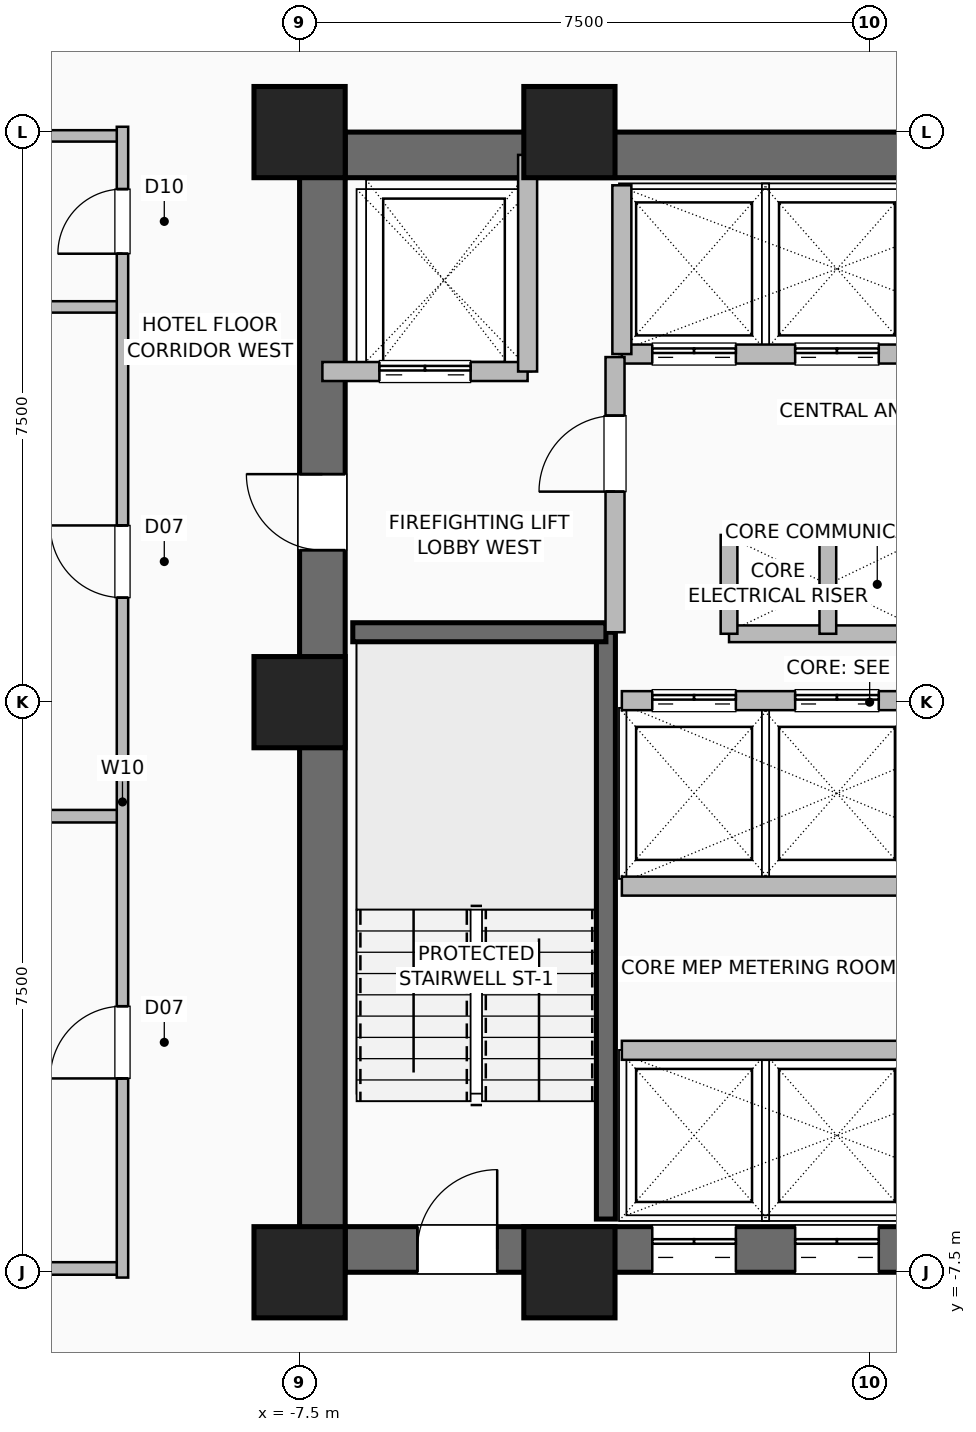
"""IFC4 building model, lengths in metres.
Left out: names, types, materials, properties, quantities, classifications, styles, units other than length and angle.
Written with IfcOpenShell. Run it as: python <this file> out.ifc"""

import sys

from ifc_helpers import new_model, si_unit, direction, frame, frame_2d, origin, origin_2d, place, context, subcontext, project, spatial, rectangle, hollow_rectangle, extrude, element, fill, save


model = new_model("IFC4")
c1 = context("Model", 3, precision=1e-05, world=origin(), true_north=direction((0.0, 1.0)))
c2 = subcontext(c1, "Body", "Model", "MODEL_VIEW")
j1 = project(units=[si_unit("LENGTHUNIT", "METRE"), si_unit("PLANEANGLEUNIT", "RADIAN")], contexts=[c1])
p1 = place(None, origin())
s1 = spatial("IfcSite", under=j1, at=p1, CompositionType="ELEMENT")
p2 = place(p1, origin())
s2 = spatial("IfcBuilding", under=s1, at=p2, CompositionType="ELEMENT")
p3 = place(p2, frame((0.0, 0.0, 58.5)))
s3 = spatial("IfcBuildingStorey", under=s2, at=p3, CompositionType="ELEMENT", Elevation=58.5)
for number, where, z_axis, x_axis in (
    (1, (-7.5, -7.5, 0.0), (0.0, 0.0, 1.0), (1.0, 0.0, 0.0)),
    (2, (-3.95, -7.5, 0.0), (0.0, 0.0, 1.0), (1.0, 0.0, 0.0)),
    (3, (-3.95, 7.5, 0.0), (0.0, 0.0, 1.0), (1.0, 0.0, 0.0)),
    (4, (-7.5, 7.5, 0.0), (0.0, 0.0, 1.0), (1.0, 0.0, 0.0)),
    (5, (-7.5, 0.0, 0.0), (0.0, 0.0, 1.0), (1.0, 0.0, 0.0)),
):
    element("IfcColumn", number, at=place(p3, frame(where, z_axis=z_axis, x_axis=x_axis)), inside=s3, PredefinedType="COLUMN", context=c2, shape_type="SweptSolid", body=[
        extrude(hollow_rectangle(XDim=1.2, YDim=1.2, WallThickness=0.055, at=origin_2d()), origin(), (0.0, 0.0, 1.0), 3.5),
    ])
p4 = place(p3, frame((-7.5, -7.2, 0.0), z_axis=(0.0, 0.0, 1.0), x_axis=(1.0, 0.0, 0.0)))
e6 = element("IfcWall", 6, at=p4, inside=s3, PredefinedType="SHEAR", context=c2, shape_type="SweptSolid", body=[
    extrude(rectangle(XDim=15.0, YDim=0.6, at=frame_2d((7.5, 0.0))), origin(), (0.0, 0.0, 1.0), 3.25),
])
p5 = place(p4, frame((1.55, 0.0, 0.0)))
e7 = element("IfcOpeningElement", 7, at=p5, cuts=e6, PredefinedType="OPENING", context=c2, shape_type="SweptSolid", body=[
    extrude(rectangle(XDim=1.05, YDim=2.08, at=frame_2d((0.525, 1.04))), frame((0.0, 0.31, 0.0), z_axis=(0.0, -1.0, 0.0), x_axis=(1.0, 0.0, 0.0)), (0.0, 0.0, 1.0), 0.62),
])
p6 = place(p4, frame((12.4, 0.0, 0.0)))
e8 = element("IfcOpeningElement", 8, at=p6, cuts=e6, PredefinedType="OPENING", context=c2, shape_type="SweptSolid", body=[
    extrude(rectangle(XDim=1.05, YDim=2.08, at=frame_2d((0.525, 1.04))), frame((0.0, 0.31, 0.0), z_axis=(0.0, -1.0, 0.0), x_axis=(1.0, 0.0, 0.0)), (0.0, 0.0, 1.0), 0.62),
])
p7 = place(p4, frame((4.64, 0.0, 0.0)))
e9 = element("IfcOpeningElement", 9, at=p7, cuts=e6, PredefinedType="OPENING", context=c2, shape_type="SweptSolid", body=[
    extrude(rectangle(XDim=1.1, YDim=2.2, at=frame_2d((0.55, 1.1))), frame((0.0, 0.31, 0.0), z_axis=(0.0, -1.0, 0.0), x_axis=(1.0, 0.0, 0.0)), (0.0, 0.0, 1.0), 0.62),
])
p8 = place(p4, frame((6.52, 0.0, 0.0)))
e10 = element("IfcOpeningElement", 10, at=p8, cuts=e6, PredefinedType="OPENING", context=c2, shape_type="SweptSolid", body=[
    extrude(rectangle(XDim=1.1, YDim=2.2, at=frame_2d((0.55, 1.1))), frame((0.0, 0.31, 0.0), z_axis=(0.0, -1.0, 0.0), x_axis=(1.0, 0.0, 0.0)), (0.0, 0.0, 1.0), 0.62),
])
p9 = place(p4, frame((8.4, 0.0, 0.0)))
e11 = element("IfcOpeningElement", 11, at=p9, cuts=e6, PredefinedType="OPENING", context=c2, shape_type="SweptSolid", body=[
    extrude(rectangle(XDim=1.1, YDim=2.2, at=frame_2d((0.55, 1.1))), frame((0.0, 0.31, 0.0), z_axis=(0.0, -1.0, 0.0), x_axis=(1.0, 0.0, 0.0)), (0.0, 0.0, 1.0), 0.62),
])
p10 = place(p3, frame((-7.5, 7.2, 0.0), z_axis=(0.0, 0.0, 1.0), x_axis=(1.0, 0.0, 0.0)))
e12 = element("IfcWall", 12, at=p10, inside=s3, PredefinedType="SHEAR", context=c2, shape_type="SweptSolid", body=[
    extrude(rectangle(XDim=15.0, YDim=0.6, at=frame_2d((7.5, 0.0))), origin(), (0.0, 0.0, 1.0), 3.25),
])
p11 = place(p3, frame((-7.2, -7.5, 0.0), z_axis=(0.0, 0.0, 1.0), x_axis=(0.0, 1.0, 0.0)))
e13 = element("IfcWall", 13, at=p11, inside=s3, PredefinedType="SHEAR", context=c2, shape_type="SweptSolid", body=[
    extrude(rectangle(XDim=15.0, YDim=0.6, at=frame_2d((7.5, 0.0))), origin(), (0.0, 0.0, 1.0), 3.25),
])
p12 = place(p11, frame((9.5, 0.0, 0.0)))
e14 = element("IfcOpeningElement", 14, at=p12, cuts=e13, PredefinedType="OPENING", context=c2, shape_type="SweptSolid", body=[
    extrude(rectangle(XDim=1.0, YDim=2.08, at=frame_2d((0.5, 1.04))), frame((0.0, 0.31, 0.0), z_axis=(0.0, -1.0, 0.0), x_axis=(1.0, 0.0, 0.0)), (0.0, 0.0, 1.0), 0.62),
])
p13 = place(p3, frame((-3.47, -6.8, 0.0), z_axis=(0.0, 0.0, 1.0), x_axis=(0.0, 1.0, 0.0)))
e15 = element("IfcWall", 15, at=p13, inside=s3, PredefinedType="SHEAR", context=c2, shape_type="SweptSolid", body=[
    extrude(rectangle(XDim=7.72, YDim=0.25, at=frame_2d((3.86, 0.0))), origin(), (0.0, 0.0, 1.0), 3.25),
])
p14 = place(p3, frame((-6.8, 0.92, 0.0), z_axis=(0.0, 0.0, 1.0), x_axis=(1.0, 0.0, 0.0)))
e16 = element("IfcWall", 16, at=p14, inside=s3, PredefinedType="SHEAR", context=c2, shape_type="SweptSolid", body=[
    extrude(rectangle(XDim=3.33, YDim=0.25, at=frame_2d((1.665, 0.0))), origin(), (0.0, 0.0, 1.0), 3.25),
])
for number, where, z_axis, x_axis in (
    (17, (-1.85, 2.2, 0.0), (0.0, 0.0, 1.0), (1.0, 0.0, 0.0)),
    (18, (-1.85, 0.9, 0.0), (0.0, 0.0, 1.0), (1.0, 0.0, 0.0)),
):
    element("IfcWall", number, at=place(p3, frame(where, z_axis=z_axis, x_axis=x_axis)), inside=s3, PredefinedType="PARTITIONING", context=c2, shape_type="SweptSolid", body=[
        extrude(rectangle(XDim=2.6, YDim=0.22, at=frame_2d((1.3, 0.0))), origin(), (0.0, 0.0, 1.0), 3.25),
    ])
for number, where, z_axis, x_axis in (
    (19, (-0.55, 0.9, 0.0), (0.0, 0.0, 1.0), (0.0, 1.0, 0.0)),
    (20, (-1.85, 0.9, 0.0), (0.0, 0.0, 1.0), (0.0, 1.0, 0.0)),
):
    element("IfcWall", number, at=place(p3, frame(where, z_axis=z_axis, x_axis=x_axis)), inside=s3, PredefinedType="PARTITIONING", context=c2, shape_type="SweptSolid", body=[
        extrude(rectangle(XDim=1.3, YDim=0.22, at=frame_2d((0.65, 0.0))), origin(), (0.0, 0.0, 1.0), 3.25),
    ])
p15 = place(p3, frame((-3.26, -4.58, 0.0), z_axis=(0.0, 0.0, 1.0), x_axis=(1.0, 0.0, 0.0)))
e21 = element("IfcWall", 21, at=p15, inside=s3, PredefinedType="SHEAR", context=c2, shape_type="SweptSolid", body=[
    extrude(rectangle(XDim=5.64, YDim=0.25, at=frame_2d((2.82, 0.0))), origin(), (0.0, 0.0, 1.0), 3.25),
])
p16 = place(p3, frame((-3.26, 0.02, 0.0), z_axis=(0.0, 0.0, 1.0), x_axis=(1.0, 0.0, 0.0)))
e22 = element("IfcWall", 22, at=p16, inside=s3, PredefinedType="SHEAR", context=c2, shape_type="SweptSolid", body=[
    extrude(rectangle(XDim=5.64, YDim=0.25, at=frame_2d((2.82, 0.0))), origin(), (0.0, 0.0, 1.0), 3.25),
])
p17 = place(p16, frame((0.4, 0.0, 0.0)))
e23 = element("IfcOpeningElement", 23, at=p17, cuts=e22, PredefinedType="OPENING", context=c2, shape_type="SweptSolid", body=[
    extrude(rectangle(XDim=1.1, YDim=2.2, at=frame_2d((0.55, 1.1))), frame((0.0, 0.135, 0.0), z_axis=(0.0, -1.0, 0.0), x_axis=(1.0, 0.0, 0.0)), (0.0, 0.0, 1.0), 0.27),
])
p18 = place(p16, frame((2.28, 0.0, 0.0)))
e24 = element("IfcOpeningElement", 24, at=p18, cuts=e22, PredefinedType="OPENING", context=c2, shape_type="SweptSolid", body=[
    extrude(rectangle(XDim=1.1, YDim=2.2, at=frame_2d((0.55, 1.1))), frame((0.0, 0.135, 0.0), z_axis=(0.0, -1.0, 0.0), x_axis=(1.0, 0.0, 0.0)), (0.0, 0.0, 1.0), 0.27),
])
p19 = place(p16, frame((4.16, 0.0, 0.0)))
e25 = element("IfcOpeningElement", 25, at=p19, cuts=e22, PredefinedType="OPENING", context=c2, shape_type="SweptSolid", body=[
    extrude(rectangle(XDim=1.1, YDim=2.2, at=frame_2d((0.55, 1.1))), frame((0.0, 0.135, 0.0), z_axis=(0.0, -1.0, 0.0), x_axis=(1.0, 0.0, 0.0)), (0.0, 0.0, 1.0), 0.27),
])
p20 = place(p3, frame((-3.26, -2.42, 0.0), z_axis=(0.0, 0.0, 1.0), x_axis=(1.0, 0.0, 0.0)))
e26 = element("IfcWall", 26, at=p20, inside=s3, PredefinedType="SHEAR", context=c2, shape_type="SweptSolid", body=[
    extrude(rectangle(XDim=5.64, YDim=0.25, at=frame_2d((2.82, 0.0))), origin(), (0.0, 0.0, 1.0), 3.25),
])
p21 = place(p3, frame((-3.26, 4.58, 0.0), z_axis=(0.0, 0.0, 1.0), x_axis=(1.0, 0.0, 0.0)))
e27 = element("IfcWall", 27, at=p21, inside=s3, PredefinedType="SHEAR", context=c2, shape_type="SweptSolid", body=[
    extrude(rectangle(XDim=5.64, YDim=0.25, at=frame_2d((2.82, 0.0))), origin(), (0.0, 0.0, 1.0), 3.25),
])
p22 = place(p21, frame((0.4, 0.0, 0.0)))
e28 = element("IfcOpeningElement", 28, at=p22, cuts=e27, PredefinedType="OPENING", context=c2, shape_type="SweptSolid", body=[
    extrude(rectangle(XDim=1.1, YDim=2.2, at=frame_2d((0.55, 1.1))), frame((0.0, 0.135, 0.0), z_axis=(0.0, -1.0, 0.0), x_axis=(1.0, 0.0, 0.0)), (0.0, 0.0, 1.0), 0.27),
])
p23 = place(p21, frame((2.28, 0.0, 0.0)))
e29 = element("IfcOpeningElement", 29, at=p23, cuts=e27, PredefinedType="OPENING", context=c2, shape_type="SweptSolid", body=[
    extrude(rectangle(XDim=1.1, YDim=2.2, at=frame_2d((0.55, 1.1))), frame((0.0, 0.135, 0.0), z_axis=(0.0, -1.0, 0.0), x_axis=(1.0, 0.0, 0.0)), (0.0, 0.0, 1.0), 0.27),
])
p24 = place(p21, frame((4.16, 0.0, 0.0)))
e30 = element("IfcOpeningElement", 30, at=p24, cuts=e27, PredefinedType="OPENING", context=c2, shape_type="SweptSolid", body=[
    extrude(rectangle(XDim=1.1, YDim=2.2, at=frame_2d((0.55, 1.1))), frame((0.0, 0.135, 0.0), z_axis=(0.0, -1.0, 0.0), x_axis=(1.0, 0.0, 0.0)), (0.0, 0.0, 1.0), 0.27),
])
p25 = place(p3, frame((-3.26, 4.58, 0.0), z_axis=(0.0, 0.0, 1.0), x_axis=(0.0, 1.0, 0.0)))
e31 = element("IfcWall", 31, at=p25, inside=s3, PredefinedType="SHEAR", context=c2, shape_type="SweptSolid", body=[
    extrude(rectangle(XDim=2.22, YDim=0.25, at=frame_2d((1.11, 0.0))), origin(), (0.0, 0.0, 1.0), 3.25),
])
p26 = place(p3, frame((-7.2, 4.35, 0.0), z_axis=(0.0, 0.0, 1.0), x_axis=(1.0, 0.0, 0.0)))
e32 = element("IfcWall", 32, at=p26, inside=s3, PredefinedType="SHEAR", context=c2, shape_type="SweptSolid", body=[
    extrude(rectangle(XDim=2.7, YDim=0.25, at=frame_2d((1.35, 0.0))), origin(), (0.0, 0.0, 1.0), 3.25),
])
p27 = place(p26, frame((0.75, 0.0, 0.0)))
e33 = element("IfcOpeningElement", 33, at=p27, cuts=e32, PredefinedType="OPENING", context=c2, shape_type="SweptSolid", body=[
    extrude(rectangle(XDim=1.2, YDim=2.2, at=frame_2d((0.6, 1.1))), frame((0.0, 0.135, 0.0), z_axis=(0.0, -1.0, 0.0), x_axis=(1.0, 0.0, 0.0)), (0.0, 0.0, 1.0), 0.27),
])
p28 = place(p3, frame((-4.5, 4.35, 0.0), z_axis=(0.0, 0.0, 1.0), x_axis=(0.0, 1.0, 0.0)))
e34 = element("IfcWall", 34, at=p28, inside=s3, PredefinedType="SHEAR", context=c2, shape_type="SweptSolid", body=[
    extrude(rectangle(XDim=2.85, YDim=0.25, at=frame_2d((1.425, 0.0))), origin(), (0.0, 0.0, 1.0), 3.25),
])
p29 = place(p3, frame((-3.35, 0.92, 0.0), z_axis=(0.0, 0.0, 1.0), x_axis=(0.0, 1.0, 0.0)))
e35 = element("IfcWall", 35, at=p29, inside=s3, PredefinedType="SHEAR", context=c2, shape_type="SweptSolid", body=[
    extrude(rectangle(XDim=3.62, YDim=0.25, at=frame_2d((1.81, 0.0))), origin(), (0.0, 0.0, 1.0), 3.25),
])
p30 = place(p29, frame((1.85, 0.0, 0.0)))
e36 = element("IfcOpeningElement", 36, at=p30, cuts=e35, PredefinedType="OPENING", context=c2, shape_type="SweptSolid", body=[
    extrude(rectangle(XDim=1.0, YDim=2.08, at=frame_2d((0.5, 1.04))), frame((0.0, 0.135, 0.0), z_axis=(0.0, -1.0, 0.0), x_axis=(1.0, 0.0, 0.0)), (0.0, 0.0, 1.0), 0.27),
])
for number, where, z_axis, x_axis in (
    (37, (-23.82, -7.45, 0.0), (0.0, 0.0, 1.0), (1.0, 0.0, 0.0)),
    (38, (-23.82, -1.5, 0.0), (0.0, 0.0, 1.0), (1.0, 0.0, 0.0)),
):
    element("IfcWall", number, at=place(p3, frame(where, z_axis=z_axis, x_axis=x_axis)), inside=s3, PredefinedType="PLUMBINGWALL", context=c2, shape_type="SweptSolid", body=[
        extrude(rectangle(XDim=13.99, YDim=0.165, at=frame_2d((6.995, 0.0))), origin(), (0.0, 0.0, 1.0), 3.25),
    ])
for number, where, z_axis, x_axis in (
    (39, (-23.82, 5.2, 0.0), (0.0, 0.0, 1.0), (1.0, 0.0, 0.0)),
    (40, (-23.82, 7.45, 0.0), (0.0, 0.0, 1.0), (1.0, 0.0, 0.0)),
):
    element("IfcWall", number, at=place(p3, frame(where, z_axis=z_axis, x_axis=x_axis)), inside=s3, PredefinedType="PARTITIONING", context=c2, shape_type="SweptSolid", body=[
        extrude(rectangle(XDim=13.99, YDim=0.15, at=frame_2d((6.995, 0.0))), origin(), (0.0, 0.0, 1.0), 3.25),
    ])
p31 = place(p3, frame((-9.83, -7.57, 0.0), z_axis=(0.0, 0.0, 1.0), x_axis=(0.0, 1.0, 0.0)))
e41 = element("IfcWall", 41, at=p31, inside=s3, PredefinedType="PARTITIONING", context=c2, shape_type="SweptSolid", body=[
    extrude(rectangle(XDim=15.14, YDim=0.15, at=frame_2d((7.57, 0.0))), origin(), (0.0, 0.0, 1.0), 3.25),
])
p32 = place(p31, frame((2.62, 0.0, 0.0)))
e42 = element("IfcOpeningElement", 42, at=p32, cuts=e41, PredefinedType="OPENING", context=c2, shape_type="SweptSolid", body=[
    extrude(rectangle(XDim=0.95, YDim=2.06, at=frame_2d((0.475, 1.03))), frame((0.0, 0.085, 0.0), z_axis=(0.0, -1.0, 0.0), x_axis=(1.0, 0.0, 0.0)), (0.0, 0.0, 1.0), 0.17),
])
p33 = place(p31, frame((8.945, 0.0, 0.0)))
e43 = element("IfcOpeningElement", 43, at=p33, cuts=e41, PredefinedType="OPENING", context=c2, shape_type="SweptSolid", body=[
    extrude(rectangle(XDim=0.95, YDim=2.06, at=frame_2d((0.475, 1.03))), frame((0.0, 0.085, 0.0), z_axis=(0.0, -1.0, 0.0), x_axis=(1.0, 0.0, 0.0)), (0.0, 0.0, 1.0), 0.17),
])
p34 = place(p31, frame((13.47, 0.0, 0.0)))
e44 = element("IfcOpeningElement", 44, at=p34, cuts=e41, PredefinedType="OPENING", context=c2, shape_type="SweptSolid", body=[
    extrude(rectangle(XDim=0.85, YDim=2.05, at=frame_2d((0.425, 1.025))), frame((0.0, 0.085, 0.0), z_axis=(0.0, -1.0, 0.0), x_axis=(1.0, 0.0, 0.0)), (0.0, 0.0, 1.0), 0.17),
])
p35 = place(p5, origin())
e45 = element("IfcDoor", 45, at=p35, inside=s3, OperationType="SINGLE_SWING_RIGHT", PredefinedType="DOOR", context=c2, shape_type="SweptSolid", body=[
    extrude(rectangle(XDim=1.05, YDim=2.08, at=frame_2d((0.525, 1.04))), frame((0.0, 0.025, 0.0), z_axis=(0.0, -1.0, 0.0), x_axis=(1.0, 0.0, 0.0)), (0.0, 0.0, 1.0), 0.05),
])
fill(e7, e45)
p36 = place(p12, origin())
e46 = element("IfcDoor", 46, at=p36, inside=s3, OperationType="SINGLE_SWING_RIGHT", PredefinedType="DOOR", context=c2, shape_type="SweptSolid", body=[
    extrude(rectangle(XDim=1.0, YDim=2.08, at=frame_2d((0.5, 1.04))), frame((0.0, 0.025, 0.0), z_axis=(0.0, -1.0, 0.0), x_axis=(1.0, 0.0, 0.0)), (0.0, 0.0, 1.0), 0.05),
])
fill(e14, e46)
p37 = place(p7, origin())
e47 = element("IfcDoor", 47, at=p37, inside=s3, OperationType="DOUBLE_DOOR_SLIDING", PredefinedType="DOOR", context=c2, shape_type="SweptSolid", body=[
    extrude(rectangle(XDim=1.1, YDim=2.2, at=frame_2d((0.55, 1.1))), frame((0.0, 0.025, 0.0), z_axis=(0.0, -1.0, 0.0), x_axis=(1.0, 0.0, 0.0)), (0.0, 0.0, 1.0), 0.05),
])
fill(e9, e47)
p38 = place(p8, origin())
e48 = element("IfcDoor", 48, at=p38, inside=s3, OperationType="DOUBLE_DOOR_SLIDING", PredefinedType="DOOR", context=c2, shape_type="SweptSolid", body=[
    extrude(rectangle(XDim=1.1, YDim=2.2, at=frame_2d((0.55, 1.1))), frame((0.0, 0.025, 0.0), z_axis=(0.0, -1.0, 0.0), x_axis=(1.0, 0.0, 0.0)), (0.0, 0.0, 1.0), 0.05),
])
fill(e10, e48)
p39 = place(p17, origin())
e49 = element("IfcDoor", 49, at=p39, inside=s3, OperationType="DOUBLE_DOOR_SLIDING", PredefinedType="DOOR", context=c2, shape_type="SweptSolid", body=[
    extrude(rectangle(XDim=1.1, YDim=2.2, at=frame_2d((0.55, 1.1))), frame((0.0, 0.025, 0.0), z_axis=(0.0, -1.0, 0.0), x_axis=(1.0, 0.0, 0.0)), (0.0, 0.0, 1.0), 0.05),
])
fill(e23, e49)
p40 = place(p18, origin())
e50 = element("IfcDoor", 50, at=p40, inside=s3, OperationType="DOUBLE_DOOR_SLIDING", PredefinedType="DOOR", context=c2, shape_type="SweptSolid", body=[
    extrude(rectangle(XDim=1.1, YDim=2.2, at=frame_2d((0.55, 1.1))), frame((0.0, 0.025, 0.0), z_axis=(0.0, -1.0, 0.0), x_axis=(1.0, 0.0, 0.0)), (0.0, 0.0, 1.0), 0.05),
])
fill(e24, e50)
p41 = place(p22, origin())
e51 = element("IfcDoor", 51, at=p41, inside=s3, OperationType="DOUBLE_DOOR_SLIDING", PredefinedType="DOOR", context=c2, shape_type="SweptSolid", body=[
    extrude(rectangle(XDim=1.1, YDim=2.2, at=frame_2d((0.55, 1.1))), frame((0.0, 0.025, 0.0), z_axis=(0.0, -1.0, 0.0), x_axis=(1.0, 0.0, 0.0)), (0.0, 0.0, 1.0), 0.05),
])
fill(e28, e51)
p42 = place(p23, origin())
e52 = element("IfcDoor", 52, at=p42, inside=s3, OperationType="DOUBLE_DOOR_SLIDING", PredefinedType="DOOR", context=c2, shape_type="SweptSolid", body=[
    extrude(rectangle(XDim=1.1, YDim=2.2, at=frame_2d((0.55, 1.1))), frame((0.0, 0.025, 0.0), z_axis=(0.0, -1.0, 0.0), x_axis=(1.0, 0.0, 0.0)), (0.0, 0.0, 1.0), 0.05),
])
fill(e29, e52)
p43 = place(p27, origin())
e53 = element("IfcDoor", 53, at=p43, inside=s3, OperationType="DOUBLE_DOOR_SLIDING", PredefinedType="DOOR", context=c2, shape_type="SweptSolid", body=[
    extrude(rectangle(XDim=1.2, YDim=2.2, at=frame_2d((0.6, 1.1))), frame((0.0, 0.025, 0.0), z_axis=(0.0, -1.0, 0.0), x_axis=(1.0, 0.0, 0.0)), (0.0, 0.0, 1.0), 0.05),
])
fill(e33, e53)
p44 = place(p30, origin())
e54 = element("IfcDoor", 54, at=p44, inside=s3, OperationType="SINGLE_SWING_LEFT", PredefinedType="DOOR", context=c2, shape_type="SweptSolid", body=[
    extrude(rectangle(XDim=1.0, YDim=2.08, at=frame_2d((0.5, 1.04))), frame((0.0, 0.025, 0.0), z_axis=(0.0, -1.0, 0.0), x_axis=(1.0, 0.0, 0.0)), (0.0, 0.0, 1.0), 0.05),
])
fill(e36, e54)
p45 = place(p32, origin())
e55 = element("IfcDoor", 55, at=p45, inside=s3, OperationType="SINGLE_SWING_LEFT", PredefinedType="DOOR", context=c2, shape_type="SweptSolid", body=[
    extrude(rectangle(XDim=0.95, YDim=2.06, at=frame_2d((0.475, 1.03))), frame((0.0, 0.025, 0.0), z_axis=(0.0, -1.0, 0.0), x_axis=(1.0, 0.0, 0.0)), (0.0, 0.0, 1.0), 0.05),
])
fill(e42, e55)
p46 = place(p33, origin())
e56 = element("IfcDoor", 56, at=p46, inside=s3, OperationType="SINGLE_SWING_RIGHT", PredefinedType="DOOR", context=c2, shape_type="SweptSolid", body=[
    extrude(rectangle(XDim=0.95, YDim=2.06, at=frame_2d((0.475, 1.03))), frame((0.0, 0.025, 0.0), z_axis=(0.0, -1.0, 0.0), x_axis=(1.0, 0.0, 0.0)), (0.0, 0.0, 1.0), 0.05),
])
fill(e43, e56)
p47 = place(p34, origin())
e57 = element("IfcDoor", 57, at=p47, inside=s3, OperationType="SINGLE_SWING_LEFT", PredefinedType="DOOR", context=c2, shape_type="SweptSolid", body=[
    extrude(rectangle(XDim=0.85, YDim=2.05, at=frame_2d((0.425, 1.025))), frame((0.0, 0.025, 0.0), z_axis=(0.0, -1.0, 0.0), x_axis=(1.0, 0.0, 0.0)), (0.0, 0.0, 1.0), 0.05),
])
fill(e44, e57)
save(model, sys.argv[1])
